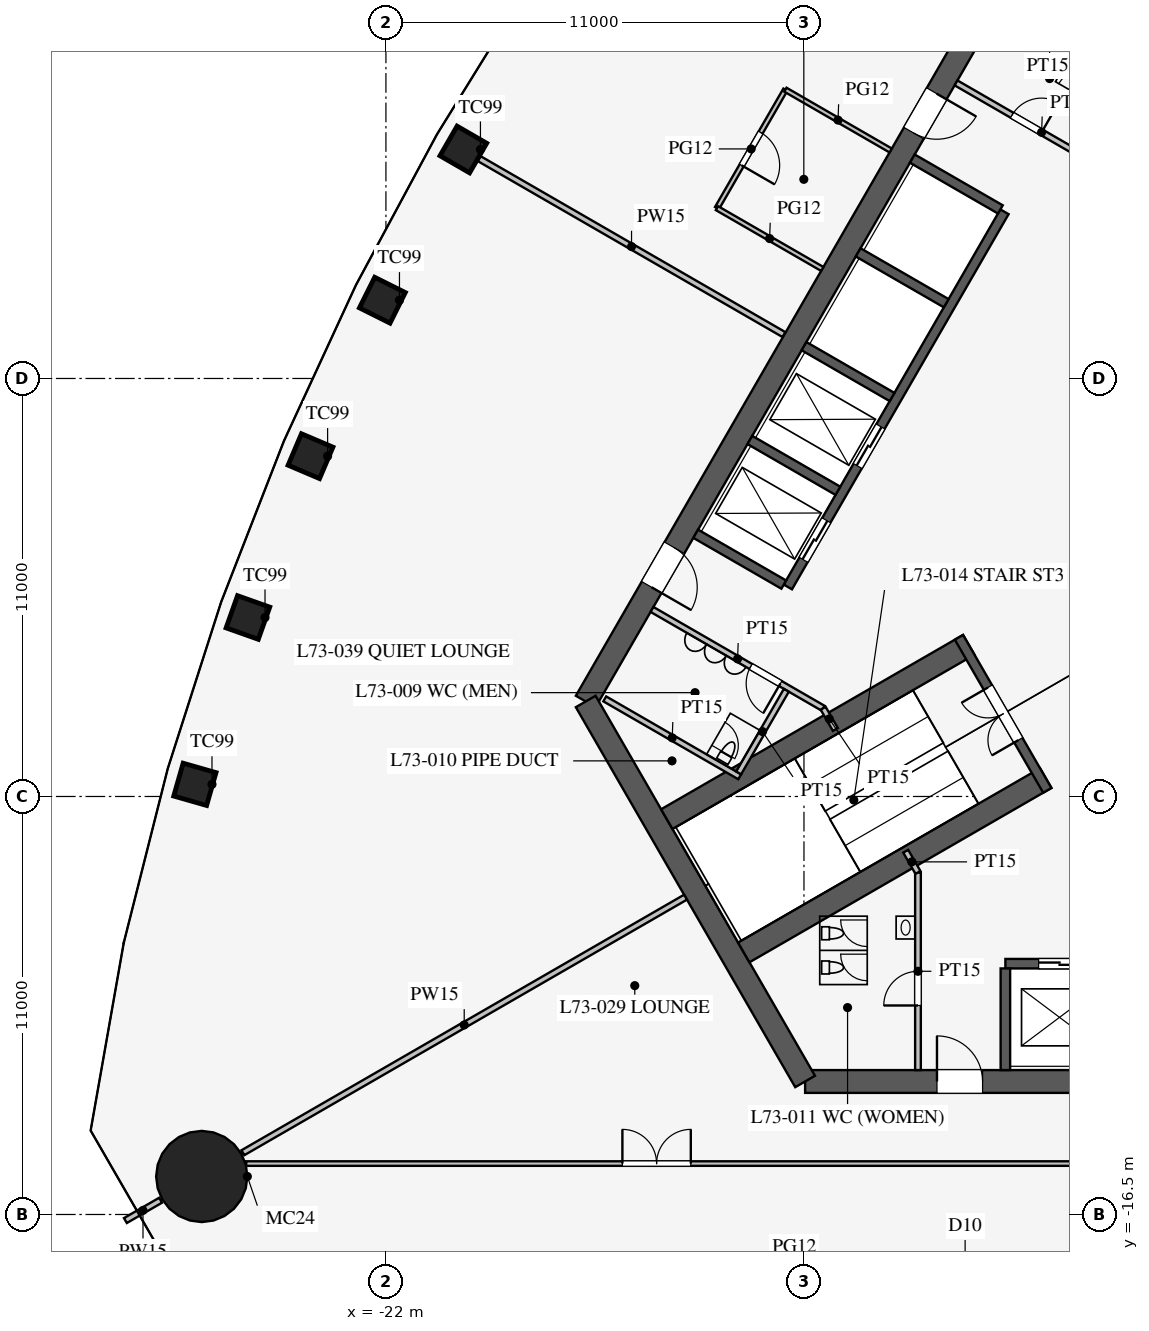
"""IFC4 building model, lengths in metres.
Left out: names, types, materials, properties, quantities, classifications, styles, units other than length and angle.
Written with IfcOpenShell. Run it as: python <this file> out.ifc"""

import sys

from ifc_helpers import new_model, si_unit, direction, frame, frame_2d, origin, origin_2d, place, context, subcontext, project, spatial, rectangle, circle, extrude, element, fill, save


model = new_model("IFC4")
c1 = context("Model", 3, precision=1e-05, world=origin(), true_north=direction((0.0, 1.0)))
c2 = subcontext(c1, "Body", "Model", "MODEL_VIEW")
j1 = project(units=[si_unit("LENGTHUNIT", "METRE"), si_unit("PLANEANGLEUNIT", "RADIAN")], contexts=[c1])
p1 = place(None, origin())
s1 = spatial("IfcSite", under=j1, at=p1, CompositionType="ELEMENT")
p2 = place(p1, origin())
s2 = spatial("IfcBuilding", under=s1, at=p2, CompositionType="ELEMENT")
p3 = place(p2, frame((0.0, 0.0, 318.3)))
s3 = spatial("IfcBuildingStorey", under=s2, at=p3, CompositionType="ELEMENT", Elevation=318.3)
for number, where, z_axis, x_axis in (
    (1, (-19.963, 11.526, 0.0), (0.0, 0.0, 1.0), (-0.5, -0.866, 0.0)),
    (2, (-22.094, 7.56, 0.0), (0.0, 0.0, 1.0), (-0.447, -0.895, 0.0)),
    (3, (-23.985, 3.455, 0.0), (0.0, 0.0, 1.0), (-0.391, -0.92, 0.0)),
    (4, (-25.632, -0.79, 0.0), (0.0, 0.0, 1.0), (-0.334, -0.942, 0.0)),
    (5, (-27.027, -5.18, 0.0), (0.0, 0.0, 1.0), (-0.275, -0.961, 0.0)),
):
    element("IfcColumn", number, at=place(p3, frame(where, z_axis=z_axis, x_axis=x_axis)), inside=s3, PredefinedType="COLUMN", context=c2, shape_type="SweptSolid", body=[
        extrude(rectangle(XDim=0.9, YDim=0.9, at=origin_2d()), origin(), (0.0, 0.0, 1.0), 4.2),
    ])
p4 = place(p3, frame((-26.847, -15.5, 0.0), z_axis=(0.0, 0.0, 1.0), x_axis=(1.0, 0.0, 0.0)))
e6 = element("IfcColumn", 6, at=p4, inside=s3, PredefinedType="COLUMN", context=c2, shape_type="SweptSolid", body=[
    extrude(circle(Radius=1.2, at=origin_2d()), origin(), (0.0, 0.0, 1.0), 4.2),
])
p5 = place(p3, frame((-10.97, -13.0, 0.0), z_axis=(0.0, 0.0, 1.0), x_axis=(1.0, 0.0, 0.0)))
e7 = element("IfcWall", 7, at=p5, inside=s3, PredefinedType="SHEAR", context=c2, shape_type="SweptSolid", body=[
    extrude(rectangle(XDim=21.939, YDim=0.6, at=frame_2d((10.97, 0.0))), origin(), (0.0, 0.0, 1.0), 4.2),
])
p6 = place(p5, frame((17.27, 0.0, 0.0)))
e8 = element("IfcOpeningElement", 8, at=p6, cuts=e7, PredefinedType="OPENING", context=c2, shape_type="SweptSolid", body=[
    extrude(rectangle(XDim=1.2, YDim=2.1, at=frame_2d((0.6, 1.05))), frame((0.0, 0.31, 0.0), z_axis=(0.0, -1.0, 0.0), x_axis=(1.0, 0.0, 0.0)), (0.0, 0.0, 1.0), 0.62),
])
p7 = place(p5, frame((3.47, 0.0, 0.0)))
e9 = element("IfcOpeningElement", 9, at=p7, cuts=e7, PredefinedType="OPENING", context=c2, shape_type="SweptSolid", body=[
    extrude(rectangle(XDim=1.2, YDim=2.1, at=frame_2d((0.6, 1.05))), frame((0.0, 0.31, 0.0), z_axis=(0.0, -1.0, 0.0), x_axis=(1.0, 0.0, 0.0)), (0.0, 0.0, 1.0), 0.62),
])
p8 = place(p3, frame((-5.773, 16.0, 0.0), z_axis=(0.0, 0.0, 1.0), x_axis=(-0.500002442456, -0.866023993627, 0.0)))
e10 = element("IfcWall", 10, at=p8, inside=s3, PredefinedType="SHEAR", context=c2, shape_type="SweptSolid", body=[
    extrude(rectangle(XDim=21.939, YDim=0.6, at=frame_2d((10.97, 0.0))), origin(), (0.0, 0.0, 1.0), 4.2),
])
p9 = place(p8, frame((17.27, 0.0, 0.0)))
e11 = element("IfcOpeningElement", 11, at=p9, cuts=e10, PredefinedType="OPENING", context=c2, shape_type="SweptSolid", body=[
    extrude(rectangle(XDim=1.2, YDim=2.1, at=frame_2d((0.6, 1.05))), frame((0.0, 0.31, 0.0), z_axis=(0.0, -1.0, 0.0), x_axis=(1.0, 0.0, 0.0)), (0.0, 0.0, 1.0), 0.62),
])
p10 = place(p8, frame((3.47, 0.0, 0.0)))
e12 = element("IfcOpeningElement", 12, at=p10, cuts=e10, PredefinedType="OPENING", context=c2, shape_type="SweptSolid", body=[
    extrude(rectangle(XDim=1.2, YDim=2.1, at=frame_2d((0.6, 1.05))), frame((0.0, 0.31, 0.0), z_axis=(0.0, -1.0, 0.0), x_axis=(1.0, 0.0, 0.0)), (0.0, 0.0, 1.0), 0.62),
])
p11 = place(p3, frame((-16.743, -3.0, 0.0), z_axis=(0.0, 0.0, 1.0), x_axis=(0.499995765644, -0.866027848477, 0.0)))
e13 = element("IfcWall", 13, at=p11, inside=s3, PredefinedType="SHEAR", context=c2, shape_type="SweptSolid", body=[
    extrude(rectangle(XDim=11.547, YDim=0.6, at=frame_2d((5.773, 0.0))), origin(), (0.0, 0.0, 1.0), 4.2),
])
p12 = place(p3, frame((-5.7, -9.9, 0.0), z_axis=(0.0, 0.0, 1.0), x_axis=(1.0, 0.0, 0.0)))
e14 = element("IfcWall", 14, at=p12, inside=s3, PredefinedType="SHEAR", context=c2, shape_type="SweptSolid", body=[
    extrude(rectangle(XDim=11.4, YDim=0.25, at=frame_2d((5.7, 0.0))), origin(), (0.0, 0.0, 1.0), 4.2),
])
p13 = place(p12, frame((0.875, 0.0, 0.0)))
e15 = element("IfcOpeningElement", 15, at=p13, cuts=e14, PredefinedType="OPENING", context=c2, shape_type="SweptSolid", body=[
    extrude(rectangle(XDim=1.1, YDim=2.2, at=frame_2d((0.55, 1.1))), frame((0.0, 0.135, 0.0), z_axis=(0.0, -1.0, 0.0), x_axis=(1.0, 0.0, 0.0)), (0.0, 0.0, 1.0), 0.27),
])
p14 = place(p12, frame((3.725, 0.0, 0.0)))
e16 = element("IfcOpeningElement", 16, at=p14, cuts=e14, PredefinedType="OPENING", context=c2, shape_type="SweptSolid", body=[
    extrude(rectangle(XDim=1.1, YDim=2.2, at=frame_2d((0.55, 1.1))), frame((0.0, 0.135, 0.0), z_axis=(0.0, -1.0, 0.0), x_axis=(1.0, 0.0, 0.0)), (0.0, 0.0, 1.0), 0.27),
])
p15 = place(p12, frame((6.575, 0.0, 0.0)))
e17 = element("IfcOpeningElement", 17, at=p15, cuts=e14, PredefinedType="OPENING", context=c2, shape_type="SweptSolid", body=[
    extrude(rectangle(XDim=1.1, YDim=2.2, at=frame_2d((0.55, 1.1))), frame((0.0, 0.135, 0.0), z_axis=(0.0, -1.0, 0.0), x_axis=(1.0, 0.0, 0.0)), (0.0, 0.0, 1.0), 0.27),
])
p16 = place(p12, frame((9.425, 0.0, 0.0)))
e18 = element("IfcOpeningElement", 18, at=p16, cuts=e14, PredefinedType="OPENING", context=c2, shape_type="SweptSolid", body=[
    extrude(rectangle(XDim=1.1, YDim=2.2, at=frame_2d((0.55, 1.1))), frame((0.0, 0.135, 0.0), z_axis=(0.0, -1.0, 0.0), x_axis=(1.0, 0.0, 0.0)), (0.0, 0.0, 1.0), 0.27),
])
p17 = place(p3, frame((-5.7, -10.025, 0.0), z_axis=(0.0, 0.0, 1.0), x_axis=(0.0, -1.0, 0.0)))
e19 = element("IfcWall", 19, at=p17, inside=s3, PredefinedType="SHEAR", context=c2, shape_type="SweptSolid", body=[
    extrude(rectangle(XDim=2.675, YDim=0.25, at=frame_2d((1.337, 0.0))), origin(), (0.0, 0.0, 1.0), 4.2),
])
p18 = place(p3, frame((-5.724, 9.886, 0.0), z_axis=(0.0, 0.0, 1.0), x_axis=(-0.500001763848, -0.866024385424, 0.0)))
e20 = element("IfcWall", 20, at=p18, inside=s3, PredefinedType="SHEAR", context=c2, shape_type="SweptSolid", body=[
    extrude(rectangle(XDim=11.4, YDim=0.25, at=frame_2d((5.7, 0.0))), origin(), (0.0, 0.0, 1.0), 4.2),
])
p19 = place(p18, frame((6.525, 0.0, 0.0)))
e21 = element("IfcOpeningElement", 21, at=p19, cuts=e20, PredefinedType="OPENING", context=c2, shape_type="SweptSolid", body=[
    extrude(rectangle(XDim=1.2, YDim=2.2, at=frame_2d((0.6, 1.1))), frame((0.0, 0.135, 0.0), z_axis=(0.0, -1.0, 0.0), x_axis=(1.0, 0.0, 0.0)), (0.0, 0.0, 1.0), 0.27),
])
p20 = place(p18, frame((9.375, 0.0, 0.0)))
e22 = element("IfcOpeningElement", 22, at=p20, cuts=e20, PredefinedType="OPENING", context=c2, shape_type="SweptSolid", body=[
    extrude(rectangle(XDim=1.2, YDim=2.2, at=frame_2d((0.6, 1.1))), frame((0.0, 0.135, 0.0), z_axis=(0.0, -1.0, 0.0), x_axis=(1.0, 0.0, 0.0)), (0.0, 0.0, 1.0), 0.27),
])
for number, where, z_axis, x_axis in (
    (23, (-5.832, 9.949, 0.0), (0.0, 0.0, 1.0), (-0.866, 0.5, 0.0)),
    (24, (-7.257, 7.481, 0.0), (0.0, 0.0, 1.0), (-0.866, 0.5, 0.0)),
    (25, (-8.682, 5.012, 0.0), (0.0, 0.0, 1.0), (-0.866, 0.5, 0.0)),
    (26, (-10.107, 2.544, 0.0), (0.0, 0.0, 1.0), (-0.866, 0.5, 0.0)),
    (27, (-11.532, 0.076, 0.0), (0.0, 0.0, 1.0), (-0.866, 0.5, 0.0)),
):
    element("IfcWall", number, at=place(p3, frame(where, z_axis=z_axis, x_axis=x_axis)), inside=s3, PredefinedType="SHEAR", context=c2, shape_type="SweptSolid", body=[
        extrude(rectangle(XDim=2.675, YDim=0.25, at=frame_2d((1.337, 0.0))), origin(), (0.0, 0.0, 1.0), 4.2),
    ])
p21 = place(p3, frame((-6.663, -1.509, 0.0), z_axis=(0.0, 0.0, 1.0), x_axis=(-0.86603049496, -0.499991181721, 0.0)))
e28 = element("IfcWall", 28, at=p21, inside=s3, PredefinedType="SHEAR", context=c2, shape_type="SweptSolid", body=[
    extrude(rectangle(XDim=9.175, YDim=0.6, at=frame_2d((4.587, 0.0))), origin(), (0.0, 0.0, 1.0), 4.2),
])
p22 = place(p3, frame((-4.638, -5.016, 0.0), z_axis=(0.0, 0.0, 1.0), x_axis=(-0.866012320003, -0.50002266109, 0.0)))
e29 = element("IfcWall", 29, at=p22, inside=s3, PredefinedType="SHEAR", context=c2, shape_type="SweptSolid", body=[
    extrude(rectangle(XDim=9.175, YDim=0.6, at=frame_2d((4.587, 0.0))), origin(), (0.0, 0.0, 1.0), 4.2),
])
p23 = place(p3, frame((-6.922, -1.312, 0.0), z_axis=(0.0, 0.0, 1.0), x_axis=(0.499984536904, -0.866034331223, 0.0)))
e30 = element("IfcWall", 30, at=p23, inside=s3, PredefinedType="SHEAR", context=c2, shape_type="SweptSolid", body=[
    extrude(rectangle(XDim=4.65, YDim=0.25, at=frame_2d((2.325, 0.0))), origin(), (0.0, 0.0, 1.0), 4.2),
])
p24 = place(p23, frame((1.525, 0.0, 0.0)))
e31 = element("IfcOpeningElement", 31, at=p24, cuts=e30, PredefinedType="OPENING", context=c2, shape_type="SweptSolid", body=[
    extrude(rectangle(XDim=1.6, YDim=2.1, at=frame_2d((0.8, 1.05))), frame((0.0, 0.135, 0.0), z_axis=(0.0, -1.0, 0.0), x_axis=(1.0, 0.0, 0.0)), (0.0, 0.0, 1.0), 0.27),
])
p25 = place(p3, frame((-8.0, -7.5, 0.0), z_axis=(0.0, 0.0, 1.0), x_axis=(0.0, -1.0, 0.0)))
e32 = element("IfcWall", 32, at=p25, inside=s3, PredefinedType="PARTITIONING", context=c2, shape_type="SweptSolid", body=[
    extrude(rectangle(XDim=5.2, YDim=0.15, at=frame_2d((2.6, 0.0))), origin(), (0.0, 0.0, 1.0), 4.0),
])
p26 = place(p25, frame((2.6, 0.0, 0.0)))
e33 = element("IfcOpeningElement", 33, at=p26, cuts=e32, PredefinedType="OPENING", context=c2, shape_type="SweptSolid", body=[
    extrude(rectangle(XDim=0.9, YDim=2.1, at=frame_2d((0.45, 1.05))), frame((0.0, 0.085, 0.0), z_axis=(0.0, -1.0, 0.0), x_axis=(1.0, 0.0, 0.0)), (0.0, 0.0, 1.0), 0.17),
])
p27 = place(p3, frame((-10.495, -3.178, 0.0), z_axis=(0.0, 0.0, 1.0), x_axis=(-0.866021400173, 0.500006934395, 0.0)))
e34 = element("IfcWall", 34, at=p27, inside=s3, PredefinedType="PARTITIONING", context=c2, shape_type="SweptSolid", body=[
    extrude(rectangle(XDim=5.2, YDim=0.15, at=frame_2d((2.6, 0.0))), origin(), (0.0, 0.0, 1.0), 4.0),
])
p28 = place(p27, frame((1.3, 0.0, 0.0)))
e35 = element("IfcOpeningElement", 35, at=p28, cuts=e34, PredefinedType="OPENING", context=c2, shape_type="SweptSolid", body=[
    extrude(rectangle(XDim=0.9, YDim=2.1, at=frame_2d((0.45, 1.05))), frame((0.0, 0.085, 0.0), z_axis=(0.0, -1.0, 0.0), x_axis=(1.0, 0.0, 0.0)), (0.0, 0.0, 1.0), 0.17),
])
p29 = place(p3, frame((-2.495, 10.678, 0.0), z_axis=(0.0, 0.0, 1.0), x_axis=(-0.866021400173, 0.500006934395, 0.0)))
e36 = element("IfcWall", 36, at=p29, inside=s3, PredefinedType="PARTITIONING", context=c2, shape_type="SweptSolid", body=[
    extrude(rectangle(XDim=5.2, YDim=0.15, at=frame_2d((2.6, 0.0))), origin(), (0.0, 0.0, 1.0), 4.0),
])
p30 = place(p29, frame((2.6, 0.0, 0.0)))
e37 = element("IfcOpeningElement", 37, at=p30, cuts=e36, PredefinedType="OPENING", context=c2, shape_type="SweptSolid", body=[
    extrude(rectangle(XDim=0.9, YDim=2.1, at=frame_2d((0.45, 1.05))), frame((0.0, 0.085, 0.0), z_axis=(0.0, -1.0, 0.0), x_axis=(1.0, 0.0, 0.0)), (0.0, 0.0, 1.0), 0.17),
])
for number, where, z_axis, x_axis in (
    (38, (-10.495, -3.178, 0.0), (0.0, 0.0, 1.0), (0.5, -0.866, 0.0)),
    (39, (-8.0, -7.5, 0.0), (0.0, 0.0, 1.0), (-0.5, 0.866, 0.0)),
):
    element("IfcWall", number, at=place(p3, frame(where, z_axis=z_axis, x_axis=x_axis)), inside=s3, PredefinedType="PARTITIONING", context=c2, shape_type="SweptSolid", body=[
        extrude(rectangle(XDim=0.645, YDim=0.15, at=frame_2d((0.323, 0.0))), origin(), (0.0, 0.0, 1.0), 4.0),
    ])
p31 = place(p3, frame((-2.031, 13.482, 0.0), z_axis=(0.0, 0.0, 1.0), x_axis=(-0.866050731258, 0.499956128963, 0.0)))
e40 = element("IfcWall", 40, at=p31, inside=s3, PredefinedType="PARTITIONING", context=c2, shape_type="SweptSolid", body=[
    extrude(rectangle(XDim=4.1, YDim=0.15, at=frame_2d((2.05, 0.0))), origin(), (0.0, 0.0, 1.0), 4.0),
])
p32 = place(p3, frame((-12.691, -4.982, 0.0), z_axis=(0.0, 0.0, 1.0), x_axis=(-0.8660249478, 0.500000789788, 0.0)))
e41 = element("IfcWall", 41, at=p32, inside=s3, PredefinedType="PARTITIONING", context=c2, shape_type="SweptSolid", body=[
    extrude(rectangle(XDim=4.1, YDim=0.15, at=frame_2d((2.05, 0.0))), origin(), (0.0, 0.0, 1.0), 4.0),
])
p33 = place(p3, frame((-11.464, -2.706, 0.0), z_axis=(0.0, 0.0, 1.0), x_axis=(-0.50001992892, -0.866013897511, 0.0)))
e42 = element("IfcWall", 42, at=p33, inside=s3, PredefinedType="PARTITIONING", context=c2, shape_type="SweptSolid", body=[
    extrude(rectangle(XDim=2.51, YDim=0.15, at=frame_2d((1.255, 0.0))), origin(), (0.0, 0.0, 1.0), 4.0),
])
p34 = place(p3, frame((-14.116, -8.15, 0.0), z_axis=(0.0, 0.0, 1.0), x_axis=(-0.866020541135, -0.500008422262, 0.0)))
e43 = element("IfcWall", 43, at=p34, inside=s3, PredefinedType="PARTITIONING", context=c2, shape_type="SweptSolid", body=[
    extrude(rectangle(XDim=13.45, YDim=0.15, at=frame_2d((6.725, 0.0))), origin(), (0.0, 0.0, 1.0), 2.0),
])
p35 = place(p3, frame((-27.929, -16.125, 0.0), z_axis=(0.0, 0.0, 1.0), x_axis=(-0.866086810508, -0.499893625349, 0.0)))
e44 = element("IfcWall", 44, at=p35, inside=s3, PredefinedType="PARTITIONING", context=c2, shape_type="SweptSolid", body=[
    extrude(rectangle(XDim=1.07, YDim=0.15, at=frame_2d((0.535, 0.0))), origin(), (0.0, 0.0, 1.0), 2.0),
])
p36 = place(p3, frame((-25.678, -15.16, 0.0), z_axis=(0.0, 0.0, 1.0), x_axis=(1.0, 0.0, 0.0)))
e45 = element("IfcWall", 45, at=p36, inside=s3, PredefinedType="PARTITIONING", context=c2, shape_type="SweptSolid", body=[
    extrude(rectangle(XDim=51.355, YDim=0.12, at=frame_2d((25.678, 0.0))), origin(), (0.0, 0.0, 1.0), 2.9),
])
p37 = place(p36, frame((9.9, 0.0, 0.15)))
e46 = element("IfcOpeningElement", 46, at=p37, cuts=e45, PredefinedType="OPENING", context=c2, shape_type="SweptSolid", body=[
    extrude(rectangle(XDim=1.8, YDim=2.1, at=frame_2d((0.9, 1.05))), frame((0.0, 0.07, 0.0), z_axis=(0.0, -1.0, 0.0), x_axis=(1.0, 0.0, 0.0)), (0.0, 0.0, 1.0), 0.14),
])
p38 = place(p36, frame((39.65, 0.0, 0.15)))
e47 = element("IfcOpeningElement", 47, at=p38, cuts=e45, PredefinedType="OPENING", context=c2, shape_type="SweptSolid", body=[
    extrude(rectangle(XDim=1.8, YDim=2.1, at=frame_2d((0.9, 1.05))), frame((0.0, 0.07, 0.0), z_axis=(0.0, -1.0, 0.0), x_axis=(1.0, 0.0, 0.0)), (0.0, 0.0, 1.0), 0.14),
])
p39 = place(p3, frame((-11.527, 6.655, 0.0), z_axis=(0.0, 0.0, 1.0), x_axis=(-0.866021846952, 0.500006160563, 0.0)))
e48 = element("IfcWall", 48, at=p39, inside=s3, PredefinedType="PARTITIONING", context=c2, shape_type="SweptSolid", body=[
    extrude(rectangle(XDim=9.262, YDim=0.15, at=frame_2d((4.631, 0.0))), origin(), (0.0, 0.0, 1.0), 3.3),
])
p40 = place(p3, frame((-11.49, 13.1, 0.0), z_axis=(0.0, 0.0, 1.0), x_axis=(-0.499931829785, -0.866064758299, 0.0)))
e49 = element("IfcWall", 49, at=p40, inside=s3, PredefinedType="PARTITIONING", context=c2, shape_type="SweptSolid", body=[
    extrude(rectangle(XDim=3.6, YDim=0.12, at=frame_2d((1.8, 0.0))), origin(), (0.0, 0.0, 1.0), 2.9),
])
p41 = place(p40, frame((1.3, 0.0, 0.15)))
e50 = element("IfcOpeningElement", 50, at=p41, cuts=e49, PredefinedType="OPENING", context=c2, shape_type="SweptSolid", body=[
    extrude(rectangle(XDim=1.0, YDim=2.1, at=frame_2d((0.5, 1.05))), frame((0.0, 0.07, 0.0), z_axis=(0.0, -1.0, 0.0), x_axis=(1.0, 0.0, 0.0)), (0.0, 0.0, 1.0), 0.14),
])
p42 = place(p3, frame((-10.518, 8.382, 0.0), z_axis=(0.0, 0.0, 1.0), x_axis=(-0.866042017984, 0.499971222258, 0.0)))
e51 = element("IfcWall", 51, at=p42, inside=s3, PredefinedType="PARTITIONING", context=c2, shape_type="SweptSolid", body=[
    extrude(rectangle(XDim=3.2, YDim=0.12, at=frame_2d((1.6, 0.0))), origin(), (0.0, 0.0, 1.0), 2.9),
])
p43 = place(p3, frame((-8.718, 11.5, 0.0), z_axis=(0.0, 0.0, 1.0), x_axis=(-0.866028054938, 0.499995408039, 0.0)))
e52 = element("IfcWall", 52, at=p43, inside=s3, PredefinedType="PARTITIONING", context=c2, shape_type="SweptSolid", body=[
    extrude(rectangle(XDim=3.2, YDim=0.12, at=frame_2d((1.6, 0.0))), origin(), (0.0, 0.0, 1.0), 2.9),
])
p44 = place(p26, frame((0.9, 0.0, 0.0), z_axis=(0.0, 0.0, 1.0), x_axis=(-1.0, 0.0, 0.0)))
e53 = element("IfcDoor", 53, at=p44, inside=s3, OperationType="SINGLE_SWING_LEFT", PredefinedType="DOOR", context=c2, shape_type="SweptSolid", body=[
    extrude(rectangle(XDim=0.9, YDim=2.1, at=frame_2d((0.45, 1.05))), frame((0.0, 0.025, 0.0), z_axis=(0.0, -1.0, 0.0), x_axis=(1.0, 0.0, 0.0)), (0.0, 0.0, 1.0), 0.05),
])
fill(e33, e53)
p45 = place(p28, origin())
e54 = element("IfcDoor", 54, at=p45, inside=s3, OperationType="SINGLE_SWING_LEFT", PredefinedType="DOOR", context=c2, shape_type="SweptSolid", body=[
    extrude(rectangle(XDim=0.9, YDim=2.1, at=frame_2d((0.45, 1.05))), frame((0.0, 0.025, 0.0), z_axis=(0.0, -1.0, 0.0), x_axis=(1.0, 0.0, 0.0)), (0.0, 0.0, 1.0), 0.05),
])
fill(e35, e54)
p46 = place(p30, frame((0.9, 0.0, 0.0), z_axis=(0.0, 0.0, 1.0), x_axis=(-1.0, 0.0, 0.0)))
e55 = element("IfcDoor", 55, at=p46, inside=s3, OperationType="SINGLE_SWING_RIGHT", PredefinedType="DOOR", context=c2, shape_type="SweptSolid", body=[
    extrude(rectangle(XDim=0.9, YDim=2.1, at=frame_2d((0.45, 1.05))), frame((0.0, 0.025, 0.0), z_axis=(0.0, -1.0, 0.0), x_axis=(1.0, 0.0, 0.0)), (0.0, 0.0, 1.0), 0.05),
])
fill(e37, e55)
p47 = place(p24, frame((1.6, 0.0, 0.0), z_axis=(0.0, 0.0, 1.0), x_axis=(-1.0, 0.0, 0.0)))
e56 = element("IfcDoor", 56, at=p47, inside=s3, OperationType="DOUBLE_DOOR_SINGLE_SWING", PredefinedType="DOOR", context=c2, shape_type="SweptSolid", body=[
    extrude(rectangle(XDim=1.6, YDim=2.1, at=frame_2d((0.8, 1.05))), frame((0.0, 0.025, 0.0), z_axis=(0.0, -1.0, 0.0), x_axis=(1.0, 0.0, 0.0)), (0.0, 0.0, 1.0), 0.05),
])
fill(e31, e56)
p48 = place(p7, origin())
e57 = element("IfcDoor", 57, at=p48, inside=s3, OperationType="SINGLE_SWING_LEFT", PredefinedType="DOOR", context=c2, shape_type="SweptSolid", body=[
    extrude(rectangle(XDim=1.2, YDim=2.1, at=frame_2d((0.6, 1.05))), frame((0.0, 0.025, 0.0), z_axis=(0.0, -1.0, 0.0), x_axis=(1.0, 0.0, 0.0)), (0.0, 0.0, 1.0), 0.05),
])
fill(e9, e57)
p49 = place(p9, origin())
e58 = element("IfcDoor", 58, at=p49, inside=s3, OperationType="SINGLE_SWING_RIGHT", PredefinedType="DOOR", context=c2, shape_type="SweptSolid", body=[
    extrude(rectangle(XDim=1.2, YDim=2.1, at=frame_2d((0.6, 1.05))), frame((0.0, 0.025, 0.0), z_axis=(0.0, -1.0, 0.0), x_axis=(1.0, 0.0, 0.0)), (0.0, 0.0, 1.0), 0.05),
])
fill(e11, e58)
p50 = place(p10, origin())
e59 = element("IfcDoor", 59, at=p50, inside=s3, OperationType="SINGLE_SWING_LEFT", PredefinedType="DOOR", context=c2, shape_type="SweptSolid", body=[
    extrude(rectangle(XDim=1.2, YDim=2.1, at=frame_2d((0.6, 1.05))), frame((0.0, 0.025, 0.0), z_axis=(0.0, -1.0, 0.0), x_axis=(1.0, 0.0, 0.0)), (0.0, 0.0, 1.0), 0.05),
])
fill(e12, e59)
p51 = place(p37, origin())
e60 = element("IfcDoor", 60, at=p51, inside=s3, OperationType="DOUBLE_DOOR_SINGLE_SWING", PredefinedType="DOOR", context=c2, shape_type="SweptSolid", body=[
    extrude(rectangle(XDim=1.8, YDim=2.1, at=frame_2d((0.9, 1.05))), frame((0.0, 0.025, 0.0), z_axis=(0.0, -1.0, 0.0), x_axis=(1.0, 0.0, 0.0)), (0.0, 0.0, 1.0), 0.05),
])
fill(e46, e60)
p52 = place(p41, origin())
e61 = element("IfcDoor", 61, at=p52, inside=s3, OperationType="SINGLE_SWING_RIGHT", PredefinedType="DOOR", context=c2, shape_type="SweptSolid", body=[
    extrude(rectangle(XDim=1.0, YDim=2.1, at=frame_2d((0.5, 1.05))), frame((0.0, 0.025, 0.0), z_axis=(0.0, -1.0, 0.0), x_axis=(1.0, 0.0, 0.0)), (0.0, 0.0, 1.0), 0.05),
])
fill(e50, e61)
p53 = place(p13, origin())
e62 = element("IfcDoor", 62, at=p53, inside=s3, OperationType="DOUBLE_DOOR_SLIDING", PredefinedType="DOOR", context=c2, shape_type="SweptSolid", body=[
    extrude(rectangle(XDim=1.1, YDim=2.2, at=frame_2d((0.55, 1.1))), frame((0.0, 0.025, 0.0), z_axis=(0.0, -1.0, 0.0), x_axis=(1.0, 0.0, 0.0)), (0.0, 0.0, 1.0), 0.05),
])
fill(e15, e62)
p54 = place(p19, origin())
e63 = element("IfcDoor", 63, at=p54, inside=s3, OperationType="DOUBLE_DOOR_SLIDING", PredefinedType="DOOR", context=c2, shape_type="SweptSolid", body=[
    extrude(rectangle(XDim=1.2, YDim=2.2, at=frame_2d((0.6, 1.1))), frame((0.0, 0.025, 0.0), z_axis=(0.0, -1.0, 0.0), x_axis=(1.0, 0.0, 0.0)), (0.0, 0.0, 1.0), 0.05),
])
fill(e21, e63)
p55 = place(p20, origin())
e64 = element("IfcDoor", 64, at=p55, inside=s3, OperationType="DOUBLE_DOOR_SLIDING", PredefinedType="DOOR", context=c2, shape_type="SweptSolid", body=[
    extrude(rectangle(XDim=1.2, YDim=2.2, at=frame_2d((0.6, 1.1))), frame((0.0, 0.025, 0.0), z_axis=(0.0, -1.0, 0.0), x_axis=(1.0, 0.0, 0.0)), (0.0, 0.0, 1.0), 0.05),
])
fill(e22, e64)
save(model, sys.argv[1])
